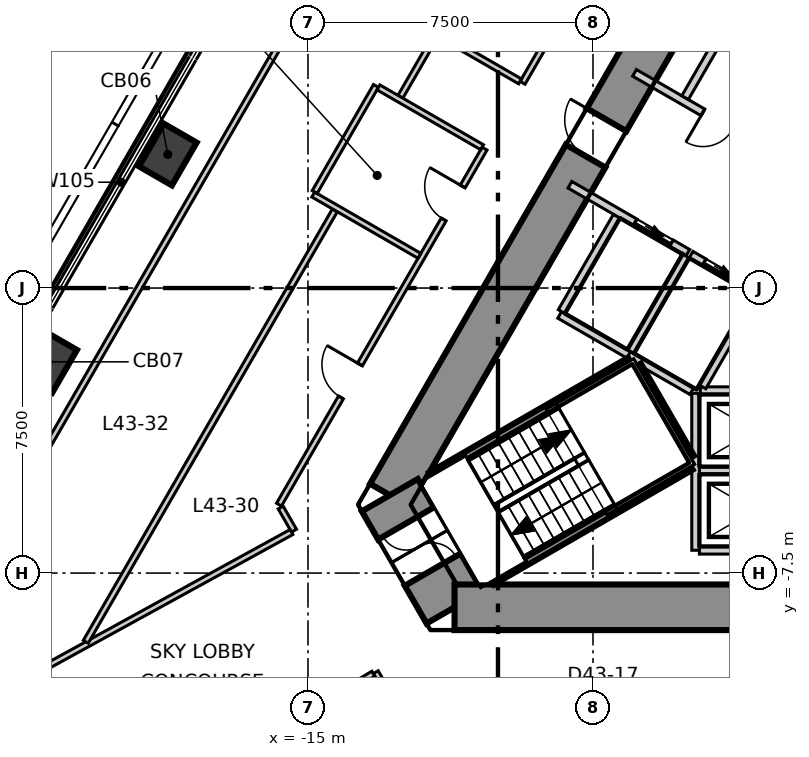
"""IFC4 building model, lengths in metres.
Left out: names, types, materials, properties, quantities, classifications, styles, units other than length and angle.
Written with IfcOpenShell. Run it as: python <this file> out.ifc"""

import sys

from ifc_helpers import new_model, si_unit, direction, frame, frame_2d, origin, origin_2d, place, context, subcontext, project, spatial, polyline, rectangle, outline, extrude, element, fill, save


model = new_model("IFC4")
c1 = context("Model", 3, precision=1e-05, world=origin(), true_north=direction((0.0, 1.0)))
c2 = subcontext(c1, "Body", "Model", "MODEL_VIEW")
j1 = project(units=[si_unit("LENGTHUNIT", "METRE"), si_unit("PLANEANGLEUNIT", "RADIAN")], contexts=[c1])
p1 = place(None, origin())
s1 = spatial("IfcSite", under=j1, at=p1, CompositionType="ELEMENT")
p2 = place(p1, origin())
s2 = spatial("IfcBuilding", under=s1, at=p2, CompositionType="ELEMENT")
p3 = place(p2, frame((0.0, 0.0, 185.3)))
s3 = spatial("IfcBuildingStorey", under=s2, at=p3, CompositionType="ELEMENT", Elevation=185.3)
p4 = place(p3, frame((-1.703, 13.85, -0.6), z_axis=(0.0, 0.0, 1.0), x_axis=(-0.500005991004, -0.866021944849, 0.0)))
e1 = element("IfcWall", 1, at=p4, inside=s3, PredefinedType="SHEAR", context=c2, shape_type="SweptSolid", body=[
    extrude(outline(polyline([(-0.635, -0.6), (1.328, -0.6), (3.291, -0.6), (5.254, -0.6), (7.217, -0.6), (9.18, -0.6), (11.143, -0.6), (13.106, -0.6), (15.069, -0.6), (17.032, -0.6), (18.995, -0.6), (20.958, -0.6), (22.921, -0.6), (21.651, 0.6), (19.74, 0.6), (17.83, 0.6), (15.919, 0.6), (14.009, 0.6), (12.098, 0.6), (10.188, 0.6), (8.277, 0.6), (6.367, 0.6), (4.456, 0.6), (2.546, 0.6), (0.635, 0.6), (-0.635, -0.6)])), origin(), (0.0, 0.0, 1.0), 6.3),
])
p5 = place(p4, frame((10.881, 0.0, 0.6)))
e2 = element("IfcOpeningElement", 2, at=p5, cuts=e1, PredefinedType="OPENING", context=c2, shape_type="SweptSolid", body=[
    extrude(rectangle(XDim=1.1, YDim=2.1, at=frame_2d((0.55, 1.05))), frame((0.0, 0.61, 0.0), z_axis=(0.0, -1.0, 0.0), x_axis=(1.0, 0.0, 0.0)), (0.0, 0.0, 1.0), 1.22),
])
p6 = place(p4, frame((4.407, 0.0, 0.6)))
e3 = element("IfcOpeningElement", 3, at=p6, cuts=e1, PredefinedType="OPENING", context=c2, shape_type="SweptSolid", body=[
    extrude(rectangle(XDim=1.0, YDim=2.1, at=frame_2d((0.5, 1.05))), frame((0.0, 0.61, 0.0), z_axis=(0.0, -1.0, 0.0), x_axis=(1.0, 0.0, 0.0)), (0.0, 0.0, 1.0), 1.22),
])
p7 = place(p3, frame((-12.846, -5.45, -0.6), z_axis=(0.0, 0.0, 1.0), x_axis=(0.499939613464, -0.86606026516, 0.0)))
e4 = element("IfcWall", 4, at=p7, inside=s3, PredefinedType="SHEAR", context=c2, shape_type="SweptSolid", body=[
    extrude(outline(polyline([(-0.202, -0.85), (1.703, -0.85), (3.608, -0.85), (3.204, 0.85), (1.703, 0.85), (0.202, 0.85), (-0.202, -0.85)])), origin(), (0.0, 0.0, 1.0), 6.3),
])
p8 = place(p7, frame((0.859, 0.0, 0.6)))
e5 = element("IfcOpeningElement", 5, at=p8, cuts=e4, PredefinedType="OPENING", context=c2, shape_type="SweptSolid", body=[
    extrude(rectangle(XDim=1.4, YDim=2.1, at=frame_2d((0.7, 1.05))), frame((0.0, 0.86, 0.0), z_axis=(0.0, -1.0, 0.0), x_axis=(1.0, 0.0, 0.0)), (0.0, 0.0, 1.0), 1.72),
])
p9 = place(p3, frame((-11.143, -8.4, -0.6), z_axis=(0.0, 0.0, 1.0), x_axis=(1.0, 0.0, 0.0)))
e6 = element("IfcWall", 6, at=p9, inside=s3, PredefinedType="SHEAR", context=c2, shape_type="SweptSolid", body=[
    extrude(outline(polyline([(-0.635, -0.6), (1.328, -0.6), (3.291, -0.6), (5.254, -0.6), (7.217, -0.6), (9.18, -0.6), (11.143, -0.6), (13.106, -0.6), (15.069, -0.6), (17.032, -0.6), (18.995, -0.6), (20.958, -0.6), (22.921, -0.6), (21.651, 0.6), (19.74, 0.6), (17.83, 0.6), (15.919, 0.6), (14.009, 0.6), (12.098, 0.6), (10.188, 0.6), (8.277, 0.6), (6.367, 0.6), (4.456, 0.6), (2.546, 0.6), (0.635, 0.6), (-0.635, -0.6)])), origin(), (0.0, 0.0, 1.0), 6.3),
])
p10 = place(p9, frame((17.002, 0.0, 0.6)))
e7 = element("IfcOpeningElement", 7, at=p10, cuts=e6, PredefinedType="OPENING", context=c2, shape_type="SweptSolid", body=[
    extrude(rectangle(XDim=0.9, YDim=2.1, at=frame_2d((0.45, 1.05))), frame((0.0, 0.61, 0.0), z_axis=(0.0, -1.0, 0.0), x_axis=(1.0, 0.0, 0.0)), (0.0, 0.0, 1.0), 1.22),
])
for number, where, z_axis, x_axis in (
    (8, (-18.688, 3.514, -0.6), (0.0, 0.0, 1.0), (0.5, 0.866, 0.0)),
    (9, (-21.838, -1.942, -0.6), (0.0, 0.0, 1.0), (0.5, 0.866, 0.0)),
):
    element("IfcColumn", number, at=place(p3, frame(where, z_axis=z_axis, x_axis=x_axis)), inside=s3, PredefinedType="COLUMN", context=c2, shape_type="SweptSolid", body=[
        extrude(rectangle(XDim=1.3, YDim=1.0, at=origin_2d()), origin(), (0.0, 0.0, 1.0), 6.3),
    ])
p11 = place(p3, frame((-15.762, -5.7, 0.0), z_axis=(0.0, 0.0, 1.0), x_axis=(0.500025268852, 0.866010814314, 0.0)))
e10 = element("IfcWall", 10, at=p11, inside=s3, PredefinedType="PARTITIONING", context=c2, shape_type="SweptSolid", body=[
    extrude(rectangle(XDim=10.817, YDim=0.15, at=frame_2d((5.409, 0.0))), origin(), (0.0, 0.0, 1.0), 5.7),
])
p12 = place(p11, frame((8.667, 0.0, 0.0)))
e11 = element("IfcOpeningElement", 11, at=p12, cuts=e10, PredefinedType="OPENING", context=c2, shape_type="SweptSolid", body=[
    extrude(rectangle(XDim=1.0, YDim=2.1, at=frame_2d((0.5, 1.05))), frame((0.0, 0.085, 0.0), z_axis=(0.0, -1.0, 0.0), x_axis=(1.0, 0.0, 0.0)), (0.0, 0.0, 1.0), 0.17),
])
p13 = place(p11, frame((3.259, 0.0, 0.0)))
e12 = element("IfcOpeningElement", 12, at=p13, cuts=e10, PredefinedType="OPENING", context=c2, shape_type="SweptSolid", body=[
    extrude(rectangle(XDim=1.0, YDim=2.1, at=frame_2d((0.5, 1.05))), frame((0.0, 0.085, 0.0), z_axis=(0.0, -1.0, 0.0), x_axis=(1.0, 0.0, 0.0)), (0.0, 0.0, 1.0), 0.17),
])
p14 = place(p3, frame((-9.353, 5.4, 0.0), z_axis=(0.0, 0.0, 1.0), x_axis=(0.500017037849, 0.866015566754, 0.0)))
e13 = element("IfcWall", 13, at=p14, inside=s3, PredefinedType="PARTITIONING", context=c2, shape_type="SweptSolid", body=[
    extrude(rectangle(XDim=12.817, YDim=0.15, at=frame_2d((6.409, 0.0))), origin(), (0.0, 0.0, 1.0), 5.7),
])
p15 = place(p14, frame((5.909, 0.0, 0.0)))
e14 = element("IfcOpeningElement", 14, at=p15, cuts=e13, PredefinedType="OPENING", context=c2, shape_type="SweptSolid", body=[
    extrude(rectangle(XDim=1.0, YDim=2.1, at=frame_2d((0.5, 1.05))), frame((0.0, 0.085, 0.0), z_axis=(0.0, -1.0, 0.0), x_axis=(1.0, 0.0, 0.0)), (0.0, 0.0, 1.0), 0.17),
])
p16 = place(p3, frame((-15.718, -5.775, 0.0), z_axis=(0.0, 0.0, 1.0), x_axis=(0.499351643437, -0.866399409162, 0.0)))
e15 = element("IfcWall", 15, at=p16, inside=s3, PredefinedType="PARTITIONING", context=c2, shape_type="SweptSolid", body=[
    extrude(rectangle(XDim=0.703, YDim=0.15, at=frame_2d((0.352, 0.0))), origin(), (0.0, 0.0, 1.0), 5.7),
])
p17 = place(p3, frame((-13.217, -10.108, 0.0), z_axis=(0.0, 0.0, 1.0), x_axis=(0.500506525424, -0.865732763622, 0.0)))
e16 = element("IfcWall", 16, at=p17, inside=s3, PredefinedType="PARTITIONING", context=c2, shape_type="SweptSolid", body=[
    extrude(rectangle(XDim=0.8, YDim=0.15, at=frame_2d((0.4, 0.0))), origin(), (0.0, 0.0, 1.0), 5.7),
])
p18 = place(p3, frame((-25.148, -11.754, 0.0), z_axis=(0.0, 0.0, 1.0), x_axis=(0.876565430859, 0.481282708419, 0.0)))
e17 = element("IfcWall", 17, at=p18, inside=s3, PredefinedType="PARTITIONING", context=c2, shape_type="SweptSolid", body=[
    extrude(rectangle(XDim=11.083, YDim=0.15, at=frame_2d((5.542, 0.0))), origin(), (0.0, 0.0, 1.0), 5.0),
])
p19 = place(p18, frame((1.825, 0.0, 0.0)))
e18 = element("IfcOpeningElement", 18, at=p19, cuts=e17, PredefinedType="OPENING", context=c2, shape_type="SweptSolid", body=[
    extrude(rectangle(XDim=1.0, YDim=2.1, at=frame_2d((0.5, 1.05))), frame((0.0, 0.085, 0.0), z_axis=(0.0, -1.0, 0.0), x_axis=(1.0, 0.0, 0.0)), (0.0, 0.0, 1.0), 0.17),
])
p20 = place(p3, frame((-20.846, -9.307, 0.0), z_axis=(0.0, 0.0, 1.0), x_axis=(0.499999225185, 0.866025851124, 0.0)))
e19 = element("IfcWall", 19, at=p20, inside=s3, PredefinedType="PARTITIONING", context=c2, shape_type="SweptSolid", body=[
    extrude(rectangle(XDim=13.108, YDim=0.15, at=frame_2d((6.554, 0.0))), origin(), (0.0, 0.0, 1.0), 5.7),
])
p21 = place(p3, frame((-12.567, 5.033, 0.0), z_axis=(0.0, 0.0, 1.0), x_axis=(0.499999287049, 0.866025815407, 0.0)))
e20 = element("IfcWall", 20, at=p21, inside=s3, PredefinedType="PARTITIONING", context=c2, shape_type="SweptSolid", body=[
    extrude(rectangle(XDim=20.434, YDim=0.15, at=frame_2d((10.217, 0.0))), origin(), (0.0, 0.0, 1.0), 5.7),
])
p22 = place(p3, frame((-26.19, -11.679, 0.0), z_axis=(0.0, 0.0, 1.0), x_axis=(0.500012382508, 0.866018254622, 0.0)))
e21 = element("IfcWall", 21, at=p22, inside=s3, PredefinedType="PARTITIONING", context=c2, shape_type="SweptSolid", body=[
    extrude(rectangle(XDim=46.505, YDim=0.15, at=frame_2d((23.252, 0.0))), origin(), (0.0, 0.0, 1.0), 5.7),
])
p23 = place(p3, frame((-22.737, -15.872, 0.0), z_axis=(0.0, 0.0, 1.0), x_axis=(0.85539296063, 0.517979616302, 0.0)))
e22 = element("IfcWall", 22, at=p23, inside=s3, PredefinedType="PARTITIONING", context=c2, shape_type="SweptSolid", body=[
    extrude(rectangle(XDim=11.055, YDim=0.15, at=frame_2d((5.527, 0.0))), origin(), (0.0, 0.0, 1.0), 5.0),
])
p24 = place(p23, frame((1.2, 0.0, 0.0)))
e23 = element("IfcOpeningElement", 23, at=p24, cuts=e22, PredefinedType="OPENING", context=c2, shape_type="SweptSolid", body=[
    extrude(rectangle(XDim=2.4, YDim=2.1, at=frame_2d((1.2, 1.05))), frame((0.0, 0.085, 0.0), z_axis=(0.0, -1.0, 0.0), x_axis=(1.0, 0.0, 0.0)), (0.0, 0.0, 1.0), 0.17),
])
p25 = place(p3, frame((-11.54, 6.662, 0.0), z_axis=(0.0, 0.0, 1.0), x_axis=(0.8660395779, -0.499975448907, 0.0)))
e24 = element("IfcWall", 24, at=p25, inside=s3, PredefinedType="PARTITIONING", context=c2, shape_type="SweptSolid", body=[
    extrude(rectangle(XDim=2.45, YDim=0.15, at=frame_2d((1.225, 0.0))), origin(), (0.0, 0.0, 1.0), 5.2),
])
p26 = place(p3, frame((-14.861, 2.46, 0.0), z_axis=(0.0, 0.0, 1.0), x_axis=(0.866087259513, -0.499892847427, 0.0)))
e25 = element("IfcWall", 25, at=p26, inside=s3, PredefinedType="PARTITIONING", context=c2, shape_type="SweptSolid", body=[
    extrude(rectangle(XDim=3.225, YDim=0.15, at=frame_2d((1.612, 0.0))), origin(), (0.0, 0.0, 1.0), 5.7),
])
p27 = place(p3, frame((-14.823, 2.525, 0.0), z_axis=(0.0, 0.0, 1.0), x_axis=(0.499860071841, 0.866106176273, 0.0)))
e26 = element("IfcWall", 26, at=p27, inside=s3, PredefinedType="PARTITIONING", context=c2, shape_type="SweptSolid", body=[
    extrude(rectangle(XDim=3.225, YDim=0.15, at=frame_2d((1.613, 0.0))), origin(), (0.0, 0.0, 1.0), 5.7),
])
p28 = place(p3, frame((-13.146, 5.28, 0.0), z_axis=(0.0, 0.0, 1.0), x_axis=(0.866035871367, -0.499981869177, 0.0)))
e27 = element("IfcWall", 27, at=p28, inside=s3, PredefinedType="PARTITIONING", context=c2, shape_type="SweptSolid", body=[
    extrude(rectangle(XDim=3.15, YDim=0.15, at=frame_2d((1.575, 0.0))), origin(), (0.0, 0.0, 1.0), 5.7),
])
p29 = place(p3, frame((-8.376, -0.707, 0.0), z_axis=(0.0, 0.0, 1.0), x_axis=(0.866067520717, -0.499927044236, 0.0)))
e28 = element("IfcWall", 28, at=p29, inside=s3, PredefinedType="SOLIDWALL", context=c2, shape_type="SweptSolid", body=[
    extrude(rectangle(XDim=2.1, YDim=0.2, at=frame_2d((1.05, 0.0))), origin(), (0.0, 0.0, 1.0), 5.7),
])
p30 = place(p3, frame((-8.326, -0.62, 0.0), z_axis=(0.0, 0.0, 1.0), x_axis=(0.500023687443, 0.866011727401, 0.0)))
e29 = element("IfcWall", 29, at=p30, inside=s3, PredefinedType="SOLIDWALL", context=c2, shape_type="SweptSolid", body=[
    extrude(rectangle(XDim=2.9, YDim=0.2, at=frame_2d((1.45, 0.0))), origin(), (0.0, 0.0, 1.0), 5.7),
])
p31 = place(p3, frame((-4.7, -4.8, 0.0), z_axis=(0.0, 0.0, 1.0), x_axis=(1.0, 0.0, 0.0)))
e30 = element("IfcWall", 30, at=p31, inside=s3, PredefinedType="SOLIDWALL", context=c2, shape_type="SweptSolid", body=[
    extrude(rectangle(XDim=2.9, YDim=0.2, at=frame_2d((1.45, 0.0))), origin(), (0.0, 0.0, 1.0), 5.7),
])
p32 = place(p3, frame((-4.8, -6.9, 0.0), z_axis=(0.0, 0.0, 1.0), x_axis=(0.0, 1.0, 0.0)))
e31 = element("IfcWall", 31, at=p32, inside=s3, PredefinedType="SOLIDWALL", context=c2, shape_type="SweptSolid", body=[
    extrude(rectangle(XDim=4.131, YDim=0.2, at=frame_2d((2.065, 0.0))), origin(), (0.0, 0.0, 1.0), 5.7),
])
p33 = place(p3, frame((-4.7, -6.9, 0.0), z_axis=(0.0, 0.0, 1.0), x_axis=(1.0, 0.0, 0.0)))
e32 = element("IfcWall", 32, at=p33, inside=s3, PredefinedType="SOLIDWALL", context=c2, shape_type="SweptSolid", body=[
    extrude(rectangle(XDim=2.9, YDim=0.2, at=frame_2d((1.45, 0.0))), origin(), (0.0, 0.0, 1.0), 5.7),
])
p34 = place(p3, frame((-4.676, -2.7, 0.0), z_axis=(0.0, 0.0, 1.0), x_axis=(1.0, 0.0, 0.0)))
e33 = element("IfcWall", 33, at=p34, inside=s3, PredefinedType="SOLIDWALL", context=c2, shape_type="SweptSolid", body=[
    extrude(rectangle(XDim=2.873, YDim=0.2, at=frame_2d((1.437, 0.0))), origin(), (0.0, 0.0, 1.0), 5.7),
])
p35 = place(p34, frame((0.937, 0.0, 0.0)))
e34 = element("IfcOpeningElement", 34, at=p35, cuts=e33, PredefinedType="OPENING", context=c2, shape_type="SweptSolid", body=[
    extrude(rectangle(XDim=1.1, YDim=2.1, at=frame_2d((0.55, 1.05))), frame((0.0, 0.11, 0.0), z_axis=(0.0, -1.0, 0.0), x_axis=(1.0, 0.0, 0.0)), (0.0, 0.0, 1.0), 0.22),
])
p36 = place(p3, frame((-8.107, 2.718, 0.0), z_axis=(0.0, 0.0, 1.0), x_axis=(0.866019870564, -0.500009583697, 0.0)))
e35 = element("IfcWall", 35, at=p36, inside=s3, PredefinedType="SOLIDWALL", context=c2, shape_type="SweptSolid", body=[
    extrude(rectangle(XDim=3.582, YDim=0.2, at=frame_2d((1.791, 0.0))), origin(), (0.0, 0.0, 1.0), 5.7),
])
p37 = place(p36, frame((1.98, 0.0, 0.0)))
e36 = element("IfcOpeningElement", 36, at=p37, cuts=e35, PredefinedType="OPENING", context=c2, shape_type="SweptSolid", body=[
    extrude(rectangle(XDim=1.1, YDim=2.1, at=frame_2d((0.55, 1.05))), frame((0.0, 0.11, 0.0), z_axis=(0.0, -1.0, 0.0), x_axis=(1.0, 0.0, 0.0)), (0.0, 0.0, 1.0), 0.22),
])
p38 = place(p3, frame((-6.407, 5.662, 0.0), z_axis=(0.0, 0.0, 1.0), x_axis=(0.866019870564, -0.500009583697, 0.0)))
e37 = element("IfcWall", 37, at=p38, inside=s3, PredefinedType="SOLIDWALL", context=c2, shape_type="SweptSolid", body=[
    extrude(rectangle(XDim=3.582, YDim=0.2, at=frame_2d((1.791, 0.0))), origin(), (0.0, 0.0, 1.0), 5.7),
])
p39 = place(p38, frame((2.08, 0.0, 0.0)))
e38 = element("IfcOpeningElement", 38, at=p39, cuts=e37, PredefinedType="OPENING", context=c2, shape_type="SweptSolid", body=[
    extrude(rectangle(XDim=0.9, YDim=2.1, at=frame_2d((0.45, 1.05))), frame((0.0, 0.11, 0.0), z_axis=(0.0, -1.0, 0.0), x_axis=(1.0, 0.0, 0.0)), (0.0, 0.0, 1.0), 0.22),
])
p40 = place(p3, frame((-5.076, 5.009, 0.0), z_axis=(0.0, 0.0, 1.0), x_axis=(0.50002537861, 0.866010750942, 0.0)))
e39 = element("IfcWall", 39, at=p40, inside=s3, PredefinedType="SOLIDWALL", context=c2, shape_type="SweptSolid", body=[
    extrude(rectangle(XDim=3.0, YDim=0.2, at=frame_2d((1.5, 0.0))), origin(), (0.0, 0.0, 1.0), 5.7),
])
p41 = place(p3, frame((-6.557, -1.757, 0.0), z_axis=(0.0, 0.0, 1.0), x_axis=(0.8659754619, -0.500086491905, 0.0)))
e40 = element("IfcWall", 40, at=p41, inside=s3, PredefinedType="SOLIDWALL", context=c2, shape_type="SweptSolid", body=[
    extrude(rectangle(XDim=1.916, YDim=0.2, at=frame_2d((0.958, 0.0))), origin(), (0.0, 0.0, 1.0), 5.7),
])
p42 = place(p3, frame((-6.507, -1.67, 0.0), z_axis=(0.0, 0.0, 1.0), x_axis=(0.50012328804, 0.865954211699, 0.0)))
e41 = element("IfcWall", 41, at=p42, inside=s3, PredefinedType="SOLIDWALL", context=c2, shape_type="SweptSolid", body=[
    extrude(rectangle(XDim=2.9, YDim=0.2, at=frame_2d((1.45, 0.0))), origin(), (0.0, 0.0, 1.0), 5.7),
])
p43 = place(p3, frame((-4.92, 0.878, 0.0), z_axis=(0.0, 0.0, 1.0), x_axis=(0.866010750942, -0.50002537861, 0.0)))
e42 = element("IfcWall", 42, at=p43, inside=s3, PredefinedType="SOLIDWALL", context=c2, shape_type="SweptSolid", body=[
    extrude(rectangle(XDim=2.0, YDim=0.2, at=frame_2d((1.0, 0.0))), origin(), (0.0, 0.0, 1.0), 5.7),
])
p44 = place(p43, frame((0.4, 0.0, 0.0)))
e43 = element("IfcOpeningElement", 43, at=p44, cuts=e42, PredefinedType="OPENING", context=c2, shape_type="SweptSolid", body=[
    extrude(rectangle(XDim=1.1, YDim=2.1, at=frame_2d((0.55, 1.05))), frame((0.0, 0.11, 0.0), z_axis=(0.0, -1.0, 0.0), x_axis=(1.0, 0.0, 0.0)), (0.0, 0.0, 1.0), 0.22),
])
p45 = place(p3, frame((-4.619, -2.6, 0.0), z_axis=(0.0, 0.0, 1.0), x_axis=(0.50009492287, 0.865970593103, 0.0)))
e44 = element("IfcWall", 44, at=p45, inside=s3, PredefinedType="SOLIDWALL", context=c2, shape_type="SweptSolid", body=[
    extrude(rectangle(XDim=2.761, YDim=0.2, at=frame_2d((1.381, 0.0))), origin(), (0.0, 0.0, 1.0), 5.7),
])
p46 = place(p3, frame((-11.76, -4.942, 0.0), z_axis=(0.0, 0.0, 1.0), x_axis=(0.866048276411, 0.499960381356, 0.0)))
e45 = element("IfcWall", 45, at=p46, inside=s3, PredefinedType="SOLIDWALL", context=c2, shape_type="SweptSolid", body=[
    extrude(rectangle(XDim=6.04, YDim=0.2, at=frame_2d((3.02, 0.0))), origin(), (0.0, 0.0, 1.0), 5.7),
])
p47 = place(p3, frame((-6.329, -2.038, 0.0), z_axis=(0.0, 0.0, 1.0), x_axis=(0.500200581029, -0.865909567298, 0.0)))
e46 = element("IfcWall", 46, at=p47, inside=s3, PredefinedType="SOLIDWALL", context=c2, shape_type="SweptSolid", body=[
    extrude(rectangle(XDim=2.799, YDim=0.2, at=frame_2d((1.399, 0.0))), origin(), (0.0, 0.0, 1.0), 5.7),
])
p48 = place(p3, frame((-10.16, -7.713, 0.0), z_axis=(0.0, 0.0, 1.0), x_axis=(0.866048276411, 0.499960381356, 0.0)))
e47 = element("IfcWall", 47, at=p48, inside=s3, PredefinedType="SOLIDWALL", context=c2, shape_type="SweptSolid", body=[
    extrude(rectangle(XDim=6.04, YDim=0.2, at=frame_2d((3.02, 0.0))), origin(), (0.0, 0.0, 1.0), 5.7),
])
p49 = place(p44, origin())
e48 = element("IfcDoor", 48, at=p49, inside=s3, OperationType="SLIDING_TO_LEFT", PredefinedType="DOOR", context=c2, shape_type="SweptSolid", body=[
    extrude(rectangle(XDim=1.1, YDim=2.1, at=frame_2d((0.55, 1.05))), frame((0.0, 0.025, 0.0), z_axis=(0.0, -1.0, 0.0), x_axis=(1.0, 0.0, 0.0)), (0.0, 0.0, 1.0), 0.05),
])
fill(e43, e48)
p50 = place(p37, origin())
e49 = element("IfcDoor", 49, at=p50, inside=s3, OperationType="SLIDING_TO_LEFT", PredefinedType="DOOR", context=c2, shape_type="SweptSolid", body=[
    extrude(rectangle(XDim=1.1, YDim=2.1, at=frame_2d((0.55, 1.05))), frame((0.0, 0.025, 0.0), z_axis=(0.0, -1.0, 0.0), x_axis=(1.0, 0.0, 0.0)), (0.0, 0.0, 1.0), 0.05),
])
fill(e36, e49)
p51 = place(p39, origin())
e50 = element("IfcDoor", 50, at=p51, inside=s3, OperationType="SINGLE_SWING_LEFT", PredefinedType="DOOR", context=c2, shape_type="SweptSolid", body=[
    extrude(rectangle(XDim=0.9, YDim=2.1, at=frame_2d((0.45, 1.05))), frame((0.0, 0.025, 0.0), z_axis=(0.0, -1.0, 0.0), x_axis=(1.0, 0.0, 0.0)), (0.0, 0.0, 1.0), 0.05),
])
fill(e38, e50)
p52 = place(p12, origin())
e51 = element("IfcDoor", 51, at=p52, inside=s3, OperationType="SINGLE_SWING_LEFT", PredefinedType="DOOR", context=c2, shape_type="SweptSolid", body=[
    extrude(rectangle(XDim=1.0, YDim=2.1, at=frame_2d((0.5, 1.05))), frame((0.0, 0.025, 0.0), z_axis=(0.0, -1.0, 0.0), x_axis=(1.0, 0.0, 0.0)), (0.0, 0.0, 1.0), 0.05),
])
fill(e11, e51)
p53 = place(p13, origin())
e52 = element("IfcDoor", 52, at=p53, inside=s3, OperationType="SINGLE_SWING_LEFT", PredefinedType="DOOR", context=c2, shape_type="SweptSolid", body=[
    extrude(rectangle(XDim=1.0, YDim=2.1, at=frame_2d((0.5, 1.05))), frame((0.0, 0.025, 0.0), z_axis=(0.0, -1.0, 0.0), x_axis=(1.0, 0.0, 0.0)), (0.0, 0.0, 1.0), 0.05),
])
fill(e12, e52)
p54 = place(p8, origin())
e53 = element("IfcDoor", 53, at=p54, inside=s3, OperationType="DOUBLE_DOOR_SINGLE_SWING", PredefinedType="DOOR", context=c2, shape_type="SweptSolid", body=[
    extrude(rectangle(XDim=1.4, YDim=2.1, at=frame_2d((0.7, 1.05))), frame((0.0, 0.025, 0.0), z_axis=(0.0, -1.0, 0.0), x_axis=(1.0, 0.0, 0.0)), (0.0, 0.0, 1.0), 0.05),
])
fill(e5, e53)
p55 = place(p5, origin())
e54 = element("IfcDoor", 54, at=p55, inside=s3, OperationType="SINGLE_SWING_LEFT", PredefinedType="DOOR", context=c2, shape_type="SweptSolid", body=[
    extrude(rectangle(XDim=1.1, YDim=2.1, at=frame_2d((0.55, 1.05))), frame((0.0, 0.025, 0.0), z_axis=(0.0, -1.0, 0.0), x_axis=(1.0, 0.0, 0.0)), (0.0, 0.0, 1.0), 0.05),
])
fill(e2, e54)
save(model, sys.argv[1])
